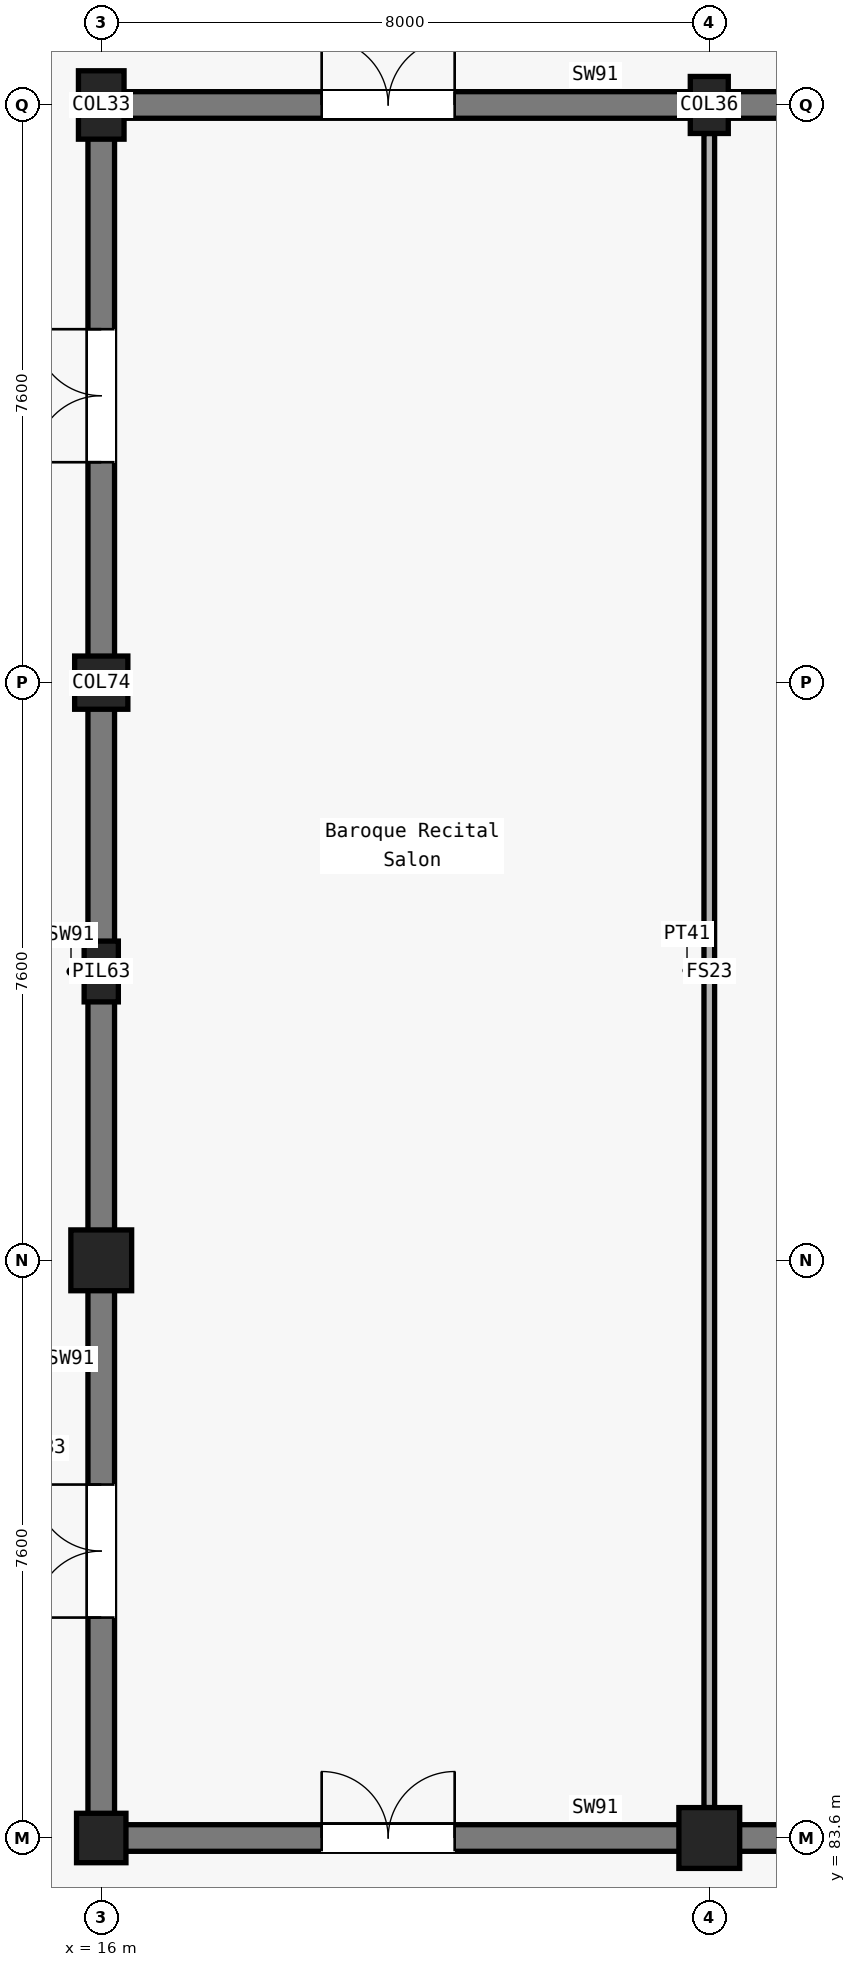
"""IFC4 building model, lengths in metres.
Left out: names, types, materials, properties, quantities, classifications, styles, units other than length and angle.
Written with IfcOpenShell. Run it as: python <this file> out.ifc"""

import sys

from ifc_helpers import new_model, si_unit, direction, frame, frame_2d, origin, origin_2d, place, context, subcontext, project, spatial, rectangle, circle, extrude, element, fill, save


model = new_model("IFC4")
c1 = context("Model", 3, precision=1e-05, world=origin(), true_north=direction((0.0, 1.0)))
c2 = subcontext(c1, "Body", "Model", "MODEL_VIEW")
j1 = project(units=[si_unit("LENGTHUNIT", "METRE"), si_unit("PLANEANGLEUNIT", "RADIAN")], contexts=[c1])
p1 = place(None, origin())
s1 = spatial("IfcSite", under=j1, at=p1, CompositionType="ELEMENT")
p2 = place(p1, origin())
s2 = spatial("IfcBuilding", under=s1, at=p2, CompositionType="ELEMENT")
p3 = place(p2, frame((0.0, 0.0, 10.2)))
s3 = spatial("IfcBuildingStorey", under=s2, at=p3, CompositionType="ELEMENT", Elevation=10.2)
p4 = place(p3, frame((16.0, 83.6, 0.0), z_axis=(0.0, 0.0, 1.0), x_axis=(1.0, 0.0, 0.0)))
e1 = element("IfcColumn", 1, at=p4, inside=s3, PredefinedType="COLUMN", context=c2, shape_type="SweptSolid", body=[
    extrude(circle(Radius=0.325, at=origin_2d()), origin(), (0.0, 0.0, 1.0), 4.8),
])
p5 = place(p3, frame((16.0, 91.2, 0.0), z_axis=(0.0, 0.0, 1.0), x_axis=(1.0, 0.0, 0.0)))
e2 = element("IfcColumn", 2, at=p5, inside=s3, PredefinedType="COLUMN", context=c2, shape_type="SweptSolid", body=[
    extrude(rectangle(XDim=0.8, YDim=0.8, at=origin_2d()), origin(), (0.0, 0.0, 1.0), 4.8),
])
p6 = place(p3, frame((16.0, 98.8, 0.0), z_axis=(0.0, 0.0, 1.0), x_axis=(1.0, 0.0, 0.0)))
e3 = element("IfcColumn", 3, at=p6, inside=s3, PredefinedType="COLUMN", context=c2, shape_type="SweptSolid", body=[
    extrude(rectangle(XDim=0.7, YDim=0.7, at=origin_2d()), origin(), (0.0, 0.0, 1.0), 4.8),
])
p7 = place(p3, frame((16.0, 106.4, 0.0), z_axis=(0.0, 0.0, 1.0), x_axis=(1.0, 0.0, 0.0)))
e4 = element("IfcColumn", 4, at=p7, inside=s3, PredefinedType="COLUMN", context=c2, shape_type="SweptSolid", body=[
    extrude(rectangle(XDim=0.6, YDim=0.9, at=origin_2d()), origin(), (0.0, 0.0, 1.0), 4.8),
])
p8 = place(p3, frame((24.0, 83.6, 0.0), z_axis=(0.0, 0.0, 1.0), x_axis=(1.0, 0.0, 0.0)))
e5 = element("IfcColumn", 5, at=p8, inside=s3, PredefinedType="COLUMN", context=c2, shape_type="SweptSolid", body=[
    extrude(rectangle(XDim=0.8, YDim=0.8, at=origin_2d()), origin(), (0.0, 0.0, 1.0), 4.8),
])
p9 = place(p3, frame((24.0, 106.4, 0.0), z_axis=(0.0, 0.0, 1.0), x_axis=(1.0, 0.0, 0.0)))
e6 = element("IfcColumn", 6, at=p9, inside=s3, PredefinedType="COLUMN", context=c2, shape_type="SweptSolid", body=[
    extrude(rectangle(XDim=0.5, YDim=0.75, at=origin_2d()), origin(), (0.0, 0.0, 1.0), 4.8),
])
p10 = place(p3, frame((16.0, 95.0, 0.0), z_axis=(0.0, 0.0, 1.0), x_axis=(1.0, 0.0, 0.0)))
e7 = element("IfcColumn", 7, at=p10, inside=s3, PredefinedType="PILASTER", context=c2, shape_type="SweptSolid", body=[
    extrude(rectangle(XDim=0.45, YDim=0.8, at=origin_2d()), origin(), (0.0, 0.0, 1.0), 4.8),
])
p11 = place(p3, frame((16.0, 83.6, 0.0), z_axis=(0.0, 0.0, 1.0), x_axis=(1.0, 0.0, 0.0)))
e8 = element("IfcWall", 8, at=p11, inside=s3, PredefinedType="SHEAR", context=c2, shape_type="SweptSolid", body=[
    extrude(rectangle(XDim=8.0, YDim=0.35, at=frame_2d((4.0, 0.0))), origin(), (0.0, 0.0, 1.0), 4.52),
])
p12 = place(p11, frame((2.9, 0.0, 0.0)))
e9 = element("IfcOpeningElement", 9, at=p12, cuts=e8, PredefinedType="OPENING", context=c2, shape_type="SweptSolid", body=[
    extrude(rectangle(XDim=1.75, YDim=2.25, at=frame_2d((0.875, 1.125))), frame((0.0, 0.185, 0.0), z_axis=(0.0, -1.0, 0.0), x_axis=(1.0, 0.0, 0.0)), (0.0, 0.0, 1.0), 0.37),
])
p13 = place(p3, frame((24.0, 83.6, 0.0), z_axis=(0.0, 0.0, 1.0), x_axis=(1.0, 0.0, 0.0)))
e10 = element("IfcWall", 10, at=p13, inside=s3, PredefinedType="SHEAR", context=c2, shape_type="SweptSolid", body=[
    extrude(rectangle(XDim=8.0, YDim=0.35, at=frame_2d((4.0, 0.0))), origin(), (0.0, 0.0, 1.0), 4.52),
])
p14 = place(p3, frame((16.0, 106.4, 0.0), z_axis=(0.0, 0.0, 1.0), x_axis=(1.0, 0.0, 0.0)))
e11 = element("IfcWall", 11, at=p14, inside=s3, PredefinedType="SHEAR", context=c2, shape_type="SweptSolid", body=[
    extrude(rectangle(XDim=8.0, YDim=0.35, at=frame_2d((4.0, 0.0))), origin(), (0.0, 0.0, 1.0), 4.52),
])
p15 = place(p14, frame((2.9, 0.0, 0.0)))
e12 = element("IfcOpeningElement", 12, at=p15, cuts=e11, PredefinedType="OPENING", context=c2, shape_type="SweptSolid", body=[
    extrude(rectangle(XDim=1.75, YDim=2.25, at=frame_2d((0.875, 1.125))), frame((0.0, 0.185, 0.0), z_axis=(0.0, -1.0, 0.0), x_axis=(1.0, 0.0, 0.0)), (0.0, 0.0, 1.0), 0.37),
])
p16 = place(p3, frame((24.0, 106.4, 0.0), z_axis=(0.0, 0.0, 1.0), x_axis=(1.0, 0.0, 0.0)))
e13 = element("IfcWall", 13, at=p16, inside=s3, PredefinedType="SHEAR", context=c2, shape_type="SweptSolid", body=[
    extrude(rectangle(XDim=8.0, YDim=0.35, at=frame_2d((4.0, 0.0))), origin(), (0.0, 0.0, 1.0), 4.52),
])
p17 = place(p16, frame((2.9, 0.0, 0.0)))
e14 = element("IfcOpeningElement", 14, at=p17, cuts=e13, PredefinedType="OPENING", context=c2, shape_type="SweptSolid", body=[
    extrude(rectangle(XDim=1.75, YDim=2.25, at=frame_2d((0.875, 1.125))), frame((0.0, 0.185, 0.0), z_axis=(0.0, -1.0, 0.0), x_axis=(1.0, 0.0, 0.0)), (0.0, 0.0, 1.0), 0.37),
])
p18 = place(p3, frame((16.0, 83.6, 0.0), z_axis=(0.0, 0.0, 1.0), x_axis=(0.0, 1.0, 0.0)))
e15 = element("IfcWall", 15, at=p18, inside=s3, PredefinedType="SHEAR", context=c2, shape_type="SweptSolid", body=[
    extrude(rectangle(XDim=7.6, YDim=0.35, at=frame_2d((3.8, 0.0))), origin(), (0.0, 0.0, 1.0), 4.52),
])
p19 = place(p18, frame((2.9, 0.0, 0.0)))
e16 = element("IfcOpeningElement", 16, at=p19, cuts=e15, PredefinedType="OPENING", context=c2, shape_type="SweptSolid", body=[
    extrude(rectangle(XDim=1.75, YDim=2.25, at=frame_2d((0.875, 1.125))), frame((0.0, 0.185, 0.0), z_axis=(0.0, -1.0, 0.0), x_axis=(1.0, 0.0, 0.0)), (0.0, 0.0, 1.0), 0.37),
])
p20 = place(p3, frame((16.0, 91.2, 0.0), z_axis=(0.0, 0.0, 1.0), x_axis=(0.0, 1.0, 0.0)))
e17 = element("IfcWall", 17, at=p20, inside=s3, PredefinedType="SHEAR", context=c2, shape_type="SweptSolid", body=[
    extrude(rectangle(XDim=7.6, YDim=0.35, at=frame_2d((3.8, 0.0))), origin(), (0.0, 0.0, 1.0), 4.52),
])
p21 = place(p3, frame((16.0, 98.8, 0.0), z_axis=(0.0, 0.0, 1.0), x_axis=(0.0, 1.0, 0.0)))
e18 = element("IfcWall", 18, at=p21, inside=s3, PredefinedType="SHEAR", context=c2, shape_type="SweptSolid", body=[
    extrude(rectangle(XDim=7.6, YDim=0.35, at=frame_2d((3.8, 0.0))), origin(), (0.0, 0.0, 1.0), 4.52),
])
p22 = place(p21, frame((2.9, 0.0, 0.0)))
e19 = element("IfcOpeningElement", 19, at=p22, cuts=e18, PredefinedType="OPENING", context=c2, shape_type="SweptSolid", body=[
    extrude(rectangle(XDim=1.75, YDim=2.25, at=frame_2d((0.875, 1.125))), frame((0.0, 0.185, 0.0), z_axis=(0.0, -1.0, 0.0), x_axis=(1.0, 0.0, 0.0)), (0.0, 0.0, 1.0), 0.37),
])
p23 = place(p3, frame((24.0, 84.0, 0.0), z_axis=(0.0, 0.0, 1.0), x_axis=(0.0, 1.0, 0.0)))
e20 = element("IfcWall", 20, at=p23, inside=s3, PredefinedType="PARTITIONING", context=c2, shape_type="SweptSolid", body=[
    extrude(rectangle(XDim=22.025, YDim=0.14, at=frame_2d((11.012, 0.0))), origin(), (0.0, 0.0, 1.0), 3.865),
])
p24 = place(p19, origin())
e21 = element("IfcDoor", 21, at=p24, inside=s3, OperationType="DOUBLE_DOOR_SINGLE_SWING", PredefinedType="DOOR", context=c2, shape_type="SweptSolid", body=[
    extrude(rectangle(XDim=1.75, YDim=2.25, at=frame_2d((0.875, 1.125))), frame((0.0, 0.025, 0.0), z_axis=(0.0, -1.0, 0.0), x_axis=(1.0, 0.0, 0.0)), (0.0, 0.0, 1.0), 0.05),
])
fill(e16, e21)
p25 = place(p22, origin())
e22 = element("IfcDoor", 22, at=p25, inside=s3, OperationType="DOUBLE_DOOR_SINGLE_SWING", PredefinedType="DOOR", context=c2, shape_type="SweptSolid", body=[
    extrude(rectangle(XDim=1.75, YDim=2.25, at=frame_2d((0.875, 1.125))), frame((0.0, 0.025, 0.0), z_axis=(0.0, -1.0, 0.0), x_axis=(1.0, 0.0, 0.0)), (0.0, 0.0, 1.0), 0.05),
])
fill(e19, e22)
p26 = place(p12, origin())
e23 = element("IfcDoor", 23, at=p26, inside=s3, OperationType="DOUBLE_DOOR_SINGLE_SWING", PredefinedType="DOOR", context=c2, shape_type="SweptSolid", body=[
    extrude(rectangle(XDim=1.75, YDim=2.25, at=frame_2d((0.875, 1.125))), frame((0.0, 0.025, 0.0), z_axis=(0.0, -1.0, 0.0), x_axis=(1.0, 0.0, 0.0)), (0.0, 0.0, 1.0), 0.05),
])
fill(e9, e23)
p27 = place(p15, origin())
e24 = element("IfcDoor", 24, at=p27, inside=s3, OperationType="DOUBLE_DOOR_SINGLE_SWING", PredefinedType="DOOR", context=c2, shape_type="SweptSolid", body=[
    extrude(rectangle(XDim=1.75, YDim=2.25, at=frame_2d((0.875, 1.125))), frame((0.0, 0.025, 0.0), z_axis=(0.0, -1.0, 0.0), x_axis=(1.0, 0.0, 0.0)), (0.0, 0.0, 1.0), 0.05),
])
fill(e12, e24)
save(model, sys.argv[1])
